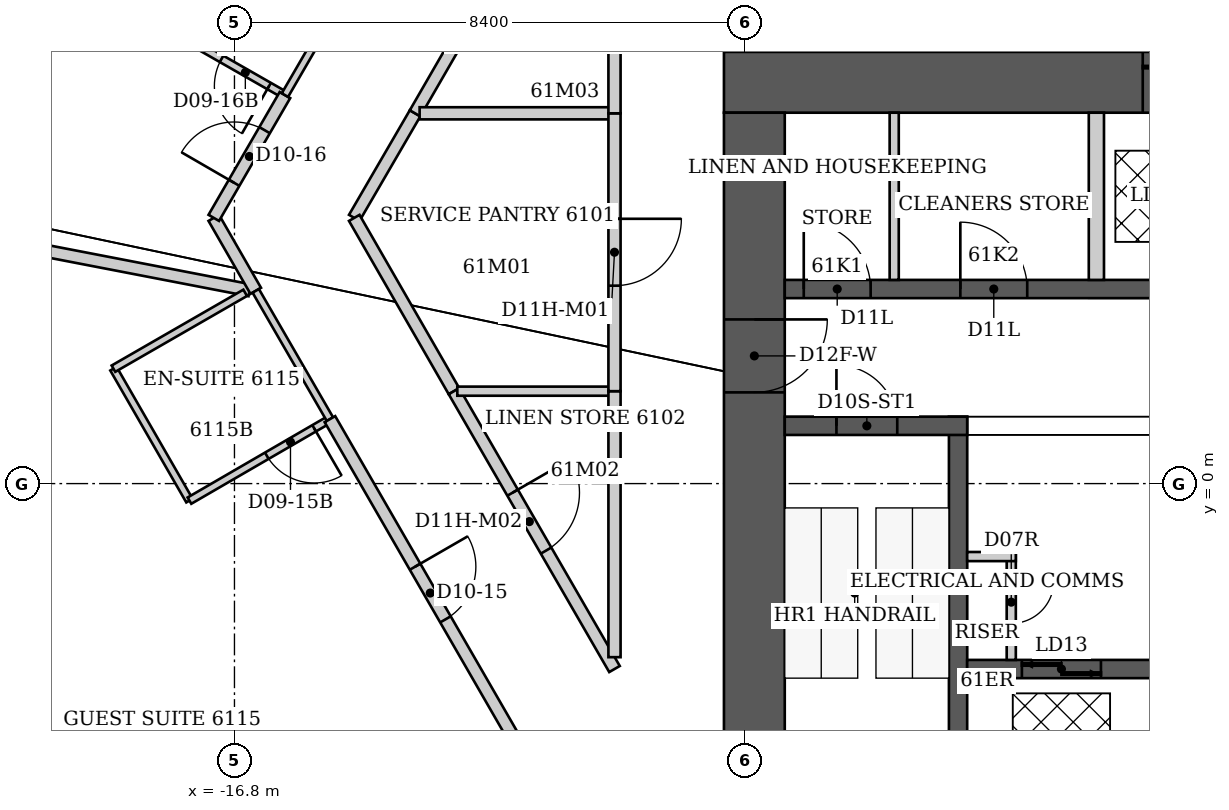
"""IFC4 building model, lengths in metres.
Left out: names, types, materials, properties, quantities, classifications, styles, units other than length and angle.
Written with IfcOpenShell. Run it as: python <this file> out.ifc"""

import sys

from ifc_helpers import new_model, si_unit, direction, frame, frame_2d, origin, origin_2d, place, context, subcontext, project, spatial, rectangle, extrude, element, fill, save


model = new_model("IFC4")
c1 = context("Model", 3, precision=1e-05, world=origin(), true_north=direction((0.0, 1.0)))
c2 = subcontext(c1, "Body", "Model", "MODEL_VIEW")
j1 = project(units=[si_unit("LENGTHUNIT", "METRE"), si_unit("PLANEANGLEUNIT", "RADIAN")], contexts=[c1])
p1 = place(None, origin())
s1 = spatial("IfcSite", under=j1, at=p1, CompositionType="ELEMENT")
p2 = place(p1, origin())
s2 = spatial("IfcBuilding", under=s1, at=p2, CompositionType="ELEMENT")
p3 = place(p2, frame((0.0, 0.0, 244.0)))
s3 = spatial("IfcBuildingStorey", under=s2, at=p3, CompositionType="ELEMENT", Elevation=244.0)
p4 = place(p3, frame((-19.374, -4.991, 0.0), z_axis=(0.054906736272, 0.014111544369, 0.998391764102), x_axis=(-0.864606052926, -0.499473967902, 0.054608869531)))
e1 = element("IfcColumn", 1, at=p4, inside=s3, PredefinedType="COLUMN", context=c2, shape_type="SweptSolid", body=[
    extrude(rectangle(XDim=1.5, YDim=1.5, at=origin_2d()), origin(), (0.0, 0.0, 1.0), 3.806),
])
p5 = place(p3, frame((-8.75, 6.6, 0.0), z_axis=(0.0, 0.0, 1.0), x_axis=(1.0, 0.0, 0.0)))
e2 = element("IfcWall", 2, at=p5, inside=s3, PredefinedType="SHEAR", context=c2, shape_type="SweptSolid", body=[
    extrude(rectangle(XDim=17.5, YDim=1.0, at=frame_2d((8.75, 0.0))), origin(), (0.0, 0.0, 1.0), 3.8),
])
p6 = place(p5, frame((6.887, 0.0, 0.0)))
e3 = element("IfcOpeningElement", 3, at=p6, cuts=e2, PredefinedType="OPENING", context=c2, shape_type="SweptSolid", body=[
    extrude(rectangle(XDim=1.1, YDim=2.1, at=frame_2d((0.55, 1.05))), frame((0.0, 0.5, 0.0), z_axis=(0.0, -1.0, 0.0), x_axis=(1.0, 0.0, 0.0)), (0.0, 0.0, 1.0), 1.0),
])
p7 = place(p5, frame((9.512, 0.0, 0.0)))
e4 = element("IfcOpeningElement", 4, at=p7, cuts=e2, PredefinedType="OPENING", context=c2, shape_type="SweptSolid", body=[
    extrude(rectangle(XDim=1.1, YDim=2.1, at=frame_2d((0.55, 1.05))), frame((0.0, 0.5, 0.0), z_axis=(0.0, -1.0, 0.0), x_axis=(1.0, 0.0, 0.0)), (0.0, 0.0, 1.0), 1.0),
])
p8 = place(p5, frame((12.137, 0.0, 0.0)))
e5 = element("IfcOpeningElement", 5, at=p8, cuts=e2, PredefinedType="OPENING", context=c2, shape_type="SweptSolid", body=[
    extrude(rectangle(XDim=1.1, YDim=2.1, at=frame_2d((0.55, 1.05))), frame((0.0, 0.5, 0.0), z_axis=(0.0, -1.0, 0.0), x_axis=(1.0, 0.0, 0.0)), (0.0, 0.0, 1.0), 1.0),
])
p9 = place(p5, frame((14.762, 0.0, 0.0)))
e6 = element("IfcOpeningElement", 6, at=p9, cuts=e2, PredefinedType="OPENING", context=c2, shape_type="SweptSolid", body=[
    extrude(rectangle(XDim=1.1, YDim=2.1, at=frame_2d((0.55, 1.05))), frame((0.0, 0.5, 0.0), z_axis=(0.0, -1.0, 0.0), x_axis=(1.0, 0.0, 0.0)), (0.0, 0.0, 1.0), 1.0),
])
p10 = place(p3, frame((-8.25, -6.1, 0.0), z_axis=(0.0, 0.0, 1.0), x_axis=(0.0, 1.0, 0.0)))
e7 = element("IfcWall", 7, at=p10, inside=s3, PredefinedType="SHEAR", context=c2, shape_type="SweptSolid", body=[
    extrude(rectangle(XDim=12.2, YDim=1.0, at=frame_2d((6.1, 0.0))), origin(), (0.0, 0.0, 1.0), 3.8),
])
p11 = place(p10, frame((7.6, 0.0, 0.0)))
e8 = element("IfcOpeningElement", 8, at=p11, cuts=e7, PredefinedType="OPENING", context=c2, shape_type="SweptSolid", body=[
    extrude(rectangle(XDim=1.2, YDim=2.2, at=frame_2d((0.6, 1.1))), frame((0.0, 0.5, 0.0), z_axis=(0.0, -1.0, 0.0), x_axis=(1.0, 0.0, 0.0)), (0.0, 0.0, 1.0), 1.0),
])
p12 = place(p3, frame((-4.9, -6.1, 0.0), z_axis=(0.0, 0.0, 1.0), x_axis=(0.0, 1.0, 0.0)))
e9 = element("IfcWall", 9, at=p12, inside=s3, PredefinedType="SHEAR", context=c2, shape_type="SweptSolid", body=[
    extrude(rectangle(XDim=7.2, YDim=0.3, at=frame_2d((3.6, 0.0))), origin(), (0.0, 0.0, 1.0), 3.8),
])
p13 = place(p3, frame((-7.75, 0.95, 0.0), z_axis=(0.0, 0.0, 1.0), x_axis=(1.0, 0.0, 0.0)))
e10 = element("IfcWall", 10, at=p13, inside=s3, PredefinedType="SHEAR", context=c2, shape_type="SweptSolid", body=[
    extrude(rectangle(XDim=3.0, YDim=0.3, at=frame_2d((1.5, 0.0))), origin(), (0.0, 0.0, 1.0), 3.8),
])
p14 = place(p13, frame((0.85, 0.0, 0.0)))
e11 = element("IfcOpeningElement", 11, at=p14, cuts=e10, PredefinedType="OPENING", context=c2, shape_type="SweptSolid", body=[
    extrude(rectangle(XDim=1.0, YDim=2.2, at=frame_2d((0.5, 1.1))), frame((0.0, 0.15, 0.0), z_axis=(0.0, -1.0, 0.0), x_axis=(1.0, 0.0, 0.0)), (0.0, 0.0, 1.0), 0.3),
])
p15 = place(p3, frame((-4.75, -3.05, 0.0), z_axis=(0.0, 0.0, 1.0), x_axis=(1.0, 0.0, 0.0)))
e12 = element("IfcWall", 12, at=p15, inside=s3, PredefinedType="SHEAR", context=c2, shape_type="SweptSolid", body=[
    extrude(rectangle(XDim=3.1, YDim=0.3, at=frame_2d((1.55, 0.0))), origin(), (0.0, 0.0, 1.0), 3.8),
])
p16 = place(p15, frame((0.9, 0.0, 0.0)))
e13 = element("IfcOpeningElement", 13, at=p16, cuts=e12, PredefinedType="OPENING", context=c2, shape_type="SweptSolid", body=[
    extrude(rectangle(XDim=1.3, YDim=2.1, at=frame_2d((0.65, 1.05))), frame((0.0, 0.15, 0.0), z_axis=(0.0, -1.0, 0.0), x_axis=(1.0, 0.0, 0.0)), (0.0, 0.0, 1.0), 0.3),
])
p17 = place(p3, frame((-7.75, 3.2, 0.0), z_axis=(0.0, 0.0, 1.0), x_axis=(1.0, 0.0, 0.0)))
e14 = element("IfcWall", 14, at=p17, inside=s3, PredefinedType="SHEAR", context=c2, shape_type="SweptSolid", body=[
    extrude(rectangle(XDim=15.5, YDim=0.3, at=frame_2d((7.75, 0.0))), origin(), (0.0, 0.0, 1.0), 3.8),
])
p18 = place(p17, frame((0.312, 0.0, 0.0)))
e15 = element("IfcOpeningElement", 15, at=p18, cuts=e14, PredefinedType="OPENING", context=c2, shape_type="SweptSolid", body=[
    extrude(rectangle(XDim=1.1, YDim=2.2, at=frame_2d((0.55, 1.1))), frame((0.0, 0.15, 0.0), z_axis=(0.0, -1.0, 0.0), x_axis=(1.0, 0.0, 0.0)), (0.0, 0.0, 1.0), 0.3),
])
p19 = place(p17, frame((2.887, 0.0, 0.0)))
e16 = element("IfcOpeningElement", 16, at=p19, cuts=e14, PredefinedType="OPENING", context=c2, shape_type="SweptSolid", body=[
    extrude(rectangle(XDim=1.1, YDim=2.2, at=frame_2d((0.55, 1.1))), frame((0.0, 0.15, 0.0), z_axis=(0.0, -1.0, 0.0), x_axis=(1.0, 0.0, 0.0)), (0.0, 0.0, 1.0), 0.3),
])
p20 = place(p3, frame((-2.625, 3.35, 0.0), z_axis=(0.0, 0.0, 1.0), x_axis=(0.0, 1.0, 0.0)))
e17 = element("IfcWall", 17, at=p20, inside=s3, PredefinedType="PARTITIONING", context=c2, shape_type="SweptSolid", body=[
    extrude(rectangle(XDim=2.75, YDim=0.25, at=frame_2d((1.375, 0.0))), origin(), (0.0, 0.0, 1.0), 3.8),
])
p21 = place(p3, frame((-27.041, 5.204, 0.0), z_axis=(0.0, 0.0, 1.0), x_axis=(0.981884490433, -0.18948046719, 0.0)))
e18 = element("IfcWall", 18, at=p21, inside=s3, PredefinedType="PARTITIONING", context=c2, shape_type="SweptSolid", body=[
    extrude(rectangle(XDim=10.684, YDim=0.2, at=frame_2d((5.342, 0.0))), origin(), (0.0, 0.0, 1.0), 3.64),
])
p22 = place(p3, frame((-18.79, 1.89, 0.0), z_axis=(0.0, 0.0, 1.0), x_axis=(0.499159685399, -0.866510016372, 0.0)))
e19 = element("IfcWall", 19, at=p22, inside=s3, PredefinedType="PARTITIONING", context=c2, shape_type="SweptSolid", body=[
    extrude(rectangle(XDim=2.504, YDim=0.12, at=frame_2d((1.252, 0.0))), origin(), (0.0, 0.0, 1.0), 3.64),
])
p23 = place(p3, frame((-18.28, 7.71, 0.0), z_axis=(0.0, 0.0, 1.0), x_axis=(0.868277022428, -0.496079643125, 0.0)))
e20 = element("IfcWall", 20, at=p23, inside=s3, PredefinedType="PARTITIONING", context=c2, shape_type="SweptSolid", body=[
    extrude(rectangle(XDim=2.66, YDim=0.12, at=frame_2d((1.33, 0.0))), origin(), (0.0, 0.0, 1.0), 3.64),
])
p24 = place(p23, frame((1.46, 0.0, 0.0)))
e21 = element("IfcOpeningElement", 21, at=p24, cuts=e20, PredefinedType="OPENING", context=c2, shape_type="SweptSolid", body=[
    extrude(rectangle(XDim=0.9, YDim=2.03, at=frame_2d((0.45, 1.015))), frame((0.0, 0.06, 0.0), z_axis=(0.0, -1.0, 0.0), x_axis=(1.0, 0.0, 0.0)), (0.0, 0.0, 1.0), 0.12),
])
p25 = place(p3, frame((-17.54, -0.28, 0.0), z_axis=(0.0, 0.0, 1.0), x_axis=(0.86498992408, 0.501789229896, 0.0)))
e22 = element("IfcWall", 22, at=p25, inside=s3, PredefinedType="PARTITIONING", context=c2, shape_type="SweptSolid", body=[
    extrude(rectangle(XDim=2.671, YDim=0.12, at=frame_2d((1.335, 0.0))), origin(), (0.0, 0.0, 1.0), 3.64),
])
p26 = place(p25, frame((1.47, 0.0, 0.0)))
e23 = element("IfcOpeningElement", 23, at=p26, cuts=e22, PredefinedType="OPENING", context=c2, shape_type="SweptSolid", body=[
    extrude(rectangle(XDim=0.9, YDim=2.03, at=frame_2d((0.45, 1.015))), frame((0.0, 0.06, 0.0), z_axis=(0.0, -1.0, 0.0), x_axis=(1.0, 0.0, 0.0)), (0.0, 0.0, 1.0), 0.12),
])
p27 = place(p3, frame((-17.14, 4.37, 0.0), z_axis=(0.0, 0.0, 1.0), x_axis=(0.498378346744, -0.866959643522, 0.0)))
e24 = element("IfcWall", 24, at=p27, inside=s3, PredefinedType="PARTITIONING", context=c2, shape_type="SweptSolid", body=[
    extrude(rectangle(XDim=1.384, YDim=0.2, at=frame_2d((0.692, 0.0))), origin(), (0.0, 0.0, 1.0), 3.64),
])
p28 = place(p3, frame((-17.14, 4.37, 0.0), z_axis=(0.0, 0.0, 1.0), x_axis=(0.501176435338, 0.865345122285, 0.0)))
e25 = element("IfcWall", 25, at=p28, inside=s3, PredefinedType="PARTITIONING", context=c2, shape_type="SweptSolid", body=[
    extrude(rectangle(XDim=2.334, YDim=0.2, at=frame_2d((1.167, 0.0))), origin(), (0.0, 0.0, 1.0), 3.64),
])
p29 = place(p28, frame((0.667, 0.0, 0.0)))
e26 = element("IfcOpeningElement", 26, at=p29, cuts=e25, PredefinedType="OPENING", context=c2, shape_type="SweptSolid", body=[
    extrude(rectangle(XDim=1.0, YDim=2.13, at=frame_2d((0.5, 1.065))), frame((0.0, 0.1, 0.0), z_axis=(0.0, -1.0, 0.0), x_axis=(1.0, 0.0, 0.0)), (0.0, 0.0, 1.0), 0.2),
])
p30 = place(p3, frame((-16.624, 3.138, 0.0), z_axis=(0.0, 0.0, 1.0), x_axis=(-0.866525185869, -0.499133351175, 0.0)))
e27 = element("IfcWall", 27, at=p30, inside=s3, PredefinedType="PARTITIONING", context=c2, shape_type="SweptSolid", body=[
    extrude(rectangle(XDim=2.5, YDim=0.12, at=frame_2d((1.25, 0.0))), origin(), (0.0, 0.0, 1.0), 3.64),
])
p31 = place(p3, frame((-16.45, 3.17, 0.0), z_axis=(0.0, 0.0, 1.0), x_axis=(0.500566296323, -0.865698205488, 0.0)))
e28 = element("IfcWall", 28, at=p31, inside=s3, PredefinedType="PARTITIONING", context=c2, shape_type="SweptSolid", body=[
    extrude(rectangle(XDim=2.437, YDim=0.12, at=frame_2d((1.219, 0.0))), origin(), (0.0, 0.0, 1.0), 3.64),
])
p32 = place(p3, frame((-15.23, 1.06, 0.0), z_axis=(0.0, 0.0, 1.0), x_axis=(0.499729921425, -0.866181277581, 0.0)))
e29 = element("IfcWall", 29, at=p32, inside=s3, PredefinedType="PARTITIONING", context=c2, shape_type="SweptSolid", body=[
    extrude(rectangle(XDim=6.604, YDim=0.2, at=frame_2d((3.302, 0.0))), origin(), (0.0, 0.0, 1.0), 3.64),
])
p33 = place(p32, frame((2.802, 0.0, 0.0)))
e30 = element("IfcOpeningElement", 30, at=p33, cuts=e29, PredefinedType="OPENING", context=c2, shape_type="SweptSolid", body=[
    extrude(rectangle(XDim=1.0, YDim=2.13, at=frame_2d((0.5, 1.065))), frame((0.0, 0.1, 0.0), z_axis=(0.0, -1.0, 0.0), x_axis=(1.0, 0.0, 0.0)), (0.0, 0.0, 1.0), 0.2),
])
p34 = place(p3, frame((-14.83, 4.37, 0.0), z_axis=(0.0, 0.0, 1.0), x_axis=(0.502626855825, 0.864503466623, 0.0)))
e31 = element("IfcWall", 31, at=p34, inside=s3, PredefinedType="PARTITIONING", context=c2, shape_type="SweptSolid", body=[
    extrude(rectangle(XDim=1.99, YDim=0.2, at=frame_2d((0.995, 0.0))), origin(), (0.0, 0.0, 1.0), 3.64),
])
p35 = place(p3, frame((-14.74, 8.51, 0.0), z_axis=(0.0, 0.0, 1.0), x_axis=(-0.501813488763, -0.864975850817, 0.0)))
e32 = element("IfcWall", 32, at=p35, inside=s3, PredefinedType="PARTITIONING", context=c2, shape_type="SweptSolid", body=[
    extrude(rectangle(XDim=2.451, YDim=0.12, at=frame_2d((1.226, 0.0))), origin(), (0.0, 0.0, 1.0), 3.64),
])
p36 = place(p3, frame((-13.83, 6.09, 0.0), z_axis=(0.0, 0.0, 1.0), x_axis=(0.500248310865, 0.865881993967, 0.0)))
e33 = element("IfcWall", 33, at=p36, inside=s3, PredefinedType="PARTITIONING", context=c2, shape_type="SweptSolid", body=[
    extrude(rectangle(XDim=5.278, YDim=0.2, at=frame_2d((2.639, 0.0))), origin(), (0.0, 0.0, 1.0), 3.64),
])
p37 = place(p3, frame((-13.755, 6.09, 0.0), z_axis=(0.0, 0.0, 1.0), x_axis=(1.0, 0.0, 0.0)))
e34 = element("IfcWall", 34, at=p37, inside=s3, PredefinedType="PARTITIONING", context=c2, shape_type="SweptSolid", body=[
    extrude(rectangle(XDim=3.195, YDim=0.2, at=frame_2d((1.597, 0.0))), origin(), (0.0, 0.0, 1.0), 3.64),
])
p38 = place(p3, frame((-13.19, 1.52, 0.0), z_axis=(0.0, 0.0, 1.0), x_axis=(-0.498775186059, 0.866731396554, 0.0)))
e35 = element("IfcWall", 35, at=p38, inside=s3, PredefinedType="PARTITIONING", context=c2, shape_type="SweptSolid", body=[
    extrude(rectangle(XDim=3.288, YDim=0.2, at=frame_2d((1.644, 0.0))), origin(), (0.0, 0.0, 1.0), 3.64),
])
p39 = place(p3, frame((-10.55, -3.05, 0.0), z_axis=(0.0, 0.0, 1.0), x_axis=(-0.500193590286, 0.865913605527, 0.0)))
e36 = element("IfcWall", 36, at=p39, inside=s3, PredefinedType="PARTITIONING", context=c2, shape_type="SweptSolid", body=[
    extrude(rectangle(XDim=5.278, YDim=0.2, at=frame_2d((2.639, 0.0))), origin(), (0.0, 0.0, 1.0), 3.64),
])
p40 = place(p39, frame((2.25, 0.0, 0.0)))
e37 = element("IfcOpeningElement", 37, at=p40, cuts=e36, PredefinedType="OPENING", context=c2, shape_type="SweptSolid", body=[
    extrude(rectangle(XDim=1.1, YDim=2.2, at=frame_2d((0.55, 1.1))), frame((0.0, 0.1, 0.0), z_axis=(0.0, -1.0, 0.0), x_axis=(1.0, 0.0, 0.0)), (0.0, 0.0, 1.0), 0.2),
])
p41 = place(p3, frame((-10.55, 1.52, 0.0), z_axis=(0.0, 0.0, 1.0), x_axis=(-1.0, 0.0, 0.0)))
e38 = element("IfcWall", 38, at=p41, inside=s3, PredefinedType="PARTITIONING", context=c2, shape_type="SweptSolid", body=[
    extrude(rectangle(XDim=2.585, YDim=0.15, at=frame_2d((1.292, 0.0))), origin(), (0.0, 0.0, 1.0), 3.64),
])
p42 = place(p3, frame((-10.55, 1.52, 0.0), z_axis=(0.0, 0.0, 1.0), x_axis=(0.0, -1.0, 0.0)))
e39 = element("IfcWall", 39, at=p42, inside=s3, PredefinedType="PARTITIONING", context=c2, shape_type="SweptSolid", body=[
    extrude(rectangle(XDim=4.375, YDim=0.2, at=frame_2d((2.188, 0.0))), origin(), (0.0, 0.0, 1.0), 3.64),
])
p43 = place(p3, frame((-10.55, 6.09, 0.0), z_axis=(0.0, 0.0, 1.0), x_axis=(0.0, -1.0, 0.0)))
e40 = element("IfcWall", 40, at=p43, inside=s3, PredefinedType="PARTITIONING", context=c2, shape_type="SweptSolid", body=[
    extrude(rectangle(XDim=4.57, YDim=0.2, at=frame_2d((2.285, 0.0))), origin(), (0.0, 0.0, 1.0), 3.64),
])
p44 = place(p43, frame((1.735, 0.0, 0.0)))
e41 = element("IfcOpeningElement", 41, at=p44, cuts=e40, PredefinedType="OPENING", context=c2, shape_type="SweptSolid", body=[
    extrude(rectangle(XDim=1.1, YDim=2.2, at=frame_2d((0.55, 1.1))), frame((0.0, 0.1, 0.0), z_axis=(0.0, -1.0, 0.0), x_axis=(1.0, 0.0, 0.0)), (0.0, 0.0, 1.0), 0.2),
])
p45 = place(p3, frame((-10.55, 8.89, 0.0), z_axis=(0.0, 0.0, 1.0), x_axis=(0.0, -1.0, 0.0)))
e42 = element("IfcWall", 42, at=p45, inside=s3, PredefinedType="PARTITIONING", context=c2, shape_type="SweptSolid", body=[
    extrude(rectangle(XDim=2.8, YDim=0.2, at=frame_2d((1.4, 0.0))), origin(), (0.0, 0.0, 1.0), 3.64),
])
p46 = place(p3, frame((-4.025, -2.9, 0.0), z_axis=(0.0, 0.0, 1.0), x_axis=(0.0, 1.0, 0.0)))
e43 = element("IfcWall", 43, at=p46, inside=s3, PredefinedType="PARTITIONING", context=c2, shape_type="SweptSolid", body=[
    extrude(rectangle(XDim=1.775, YDim=0.15, at=frame_2d((0.887, 0.0))), origin(), (0.0, 0.0, 1.0), 3.64),
])
p47 = place(p46, frame((0.6, 0.0, 0.0)))
e44 = element("IfcOpeningElement", 44, at=p47, cuts=e43, PredefinedType="OPENING", context=c2, shape_type="SweptSolid", body=[
    extrude(rectangle(XDim=0.7, YDim=2.1, at=frame_2d((0.35, 1.05))), frame((0.0, 0.075, 0.0), z_axis=(0.0, -1.0, 0.0), x_axis=(1.0, 0.0, 0.0)), (0.0, 0.0, 1.0), 0.15),
])
p48 = place(p3, frame((-4.75, -1.2, 0.0), z_axis=(0.0, 0.0, 1.0), x_axis=(1.0, 0.0, 0.0)))
e45 = element("IfcWall", 45, at=p48, inside=s3, PredefinedType="PARTITIONING", context=c2, shape_type="SweptSolid", body=[
    extrude(rectangle(XDim=0.8, YDim=0.15, at=frame_2d((0.4, 0.0))), origin(), (0.0, 0.0, 1.0), 3.64),
])
p49 = place(p3, frame((-5.95, 3.35, 0.0), z_axis=(0.0, 0.0, 1.0), x_axis=(0.0, 1.0, 0.0)))
e46 = element("IfcWall", 46, at=p49, inside=s3, PredefinedType="PARTITIONING", context=c2, shape_type="SweptSolid", body=[
    extrude(rectangle(XDim=2.75, YDim=0.15, at=frame_2d((1.375, 0.0))), origin(), (0.0, 0.0, 1.0), 3.64),
])
p50 = place(p33, origin())
e47 = element("IfcDoor", 47, at=p50, inside=s3, OperationType="SINGLE_SWING_LEFT", PredefinedType="DOOR", context=c2, shape_type="SweptSolid", body=[
    extrude(rectangle(XDim=1.0, YDim=2.13, at=frame_2d((0.5, 1.065))), frame((0.0, 0.025, 0.0), z_axis=(0.0, -1.0, 0.0), x_axis=(1.0, 0.0, 0.0)), (0.0, 0.0, 1.0), 0.05),
])
fill(e30, e47)
p51 = place(p26, origin())
e48 = element("IfcDoor", 48, at=p51, inside=s3, OperationType="SINGLE_SWING_RIGHT", PredefinedType="DOOR", context=c2, shape_type="SweptSolid", body=[
    extrude(rectangle(XDim=0.9, YDim=2.03, at=frame_2d((0.45, 1.015))), frame((0.0, 0.025, 0.0), z_axis=(0.0, -1.0, 0.0), x_axis=(1.0, 0.0, 0.0)), (0.0, 0.0, 1.0), 0.05),
])
fill(e23, e48)
p52 = place(p29, origin())
e49 = element("IfcDoor", 49, at=p52, inside=s3, OperationType="SINGLE_SWING_LEFT", PredefinedType="DOOR", context=c2, shape_type="SweptSolid", body=[
    extrude(rectangle(XDim=1.0, YDim=2.13, at=frame_2d((0.5, 1.065))), frame((0.0, 0.025, 0.0), z_axis=(0.0, -1.0, 0.0), x_axis=(1.0, 0.0, 0.0)), (0.0, 0.0, 1.0), 0.05),
])
fill(e26, e49)
p53 = place(p24, origin())
e50 = element("IfcDoor", 50, at=p53, inside=s3, OperationType="SINGLE_SWING_RIGHT", PredefinedType="DOOR", context=c2, shape_type="SweptSolid", body=[
    extrude(rectangle(XDim=0.9, YDim=2.03, at=frame_2d((0.45, 1.015))), frame((0.0, 0.025, 0.0), z_axis=(0.0, -1.0, 0.0), x_axis=(1.0, 0.0, 0.0)), (0.0, 0.0, 1.0), 0.05),
])
fill(e21, e50)
p54 = place(p44, origin())
e51 = element("IfcDoor", 51, at=p54, inside=s3, OperationType="SINGLE_SWING_LEFT", PredefinedType="DOOR", context=c2, shape_type="SweptSolid", body=[
    extrude(rectangle(XDim=1.1, YDim=2.2, at=frame_2d((0.55, 1.1))), frame((0.0, 0.025, 0.0), z_axis=(0.0, -1.0, 0.0), x_axis=(1.0, 0.0, 0.0)), (0.0, 0.0, 1.0), 0.05),
])
fill(e41, e51)
p55 = place(p40, origin())
e52 = element("IfcDoor", 52, at=p55, inside=s3, OperationType="SINGLE_SWING_RIGHT", PredefinedType="DOOR", context=c2, shape_type="SweptSolid", body=[
    extrude(rectangle(XDim=1.1, YDim=2.2, at=frame_2d((0.55, 1.1))), frame((0.0, 0.025, 0.0), z_axis=(0.0, -1.0, 0.0), x_axis=(1.0, 0.0, 0.0)), (0.0, 0.0, 1.0), 0.05),
])
fill(e37, e52)
p56 = place(p14, origin())
e53 = element("IfcDoor", 53, at=p56, inside=s3, OperationType="SINGLE_SWING_LEFT", PredefinedType="DOOR", context=c2, shape_type="SweptSolid", body=[
    extrude(rectangle(XDim=1.0, YDim=2.2, at=frame_2d((0.5, 1.1))), frame((0.0, 0.025, 0.0), z_axis=(0.0, -1.0, 0.0), x_axis=(1.0, 0.0, 0.0)), (0.0, 0.0, 1.0), 0.05),
])
fill(e11, e53)
p57 = place(p11, origin())
e54 = element("IfcDoor", 54, at=p57, inside=s3, OperationType="SINGLE_SWING_RIGHT", PredefinedType="DOOR", context=c2, shape_type="SweptSolid", body=[
    extrude(rectangle(XDim=1.2, YDim=2.2, at=frame_2d((0.6, 1.1))), frame((0.0, 0.025, 0.0), z_axis=(0.0, -1.0, 0.0), x_axis=(1.0, 0.0, 0.0)), (0.0, 0.0, 1.0), 0.05),
])
fill(e8, e54)
p58 = place(p47, origin())
e55 = element("IfcDoor", 55, at=p58, inside=s3, OperationType="SINGLE_SWING_RIGHT", PredefinedType="DOOR", context=c2, shape_type="SweptSolid", body=[
    extrude(rectangle(XDim=0.7, YDim=2.1, at=frame_2d((0.35, 1.05))), frame((0.0, 0.025, 0.0), z_axis=(0.0, -1.0, 0.0), x_axis=(1.0, 0.0, 0.0)), (0.0, 0.0, 1.0), 0.05),
])
fill(e44, e55)
p59 = place(p18, origin())
e56 = element("IfcDoor", 56, at=p59, inside=s3, OperationType="SINGLE_SWING_LEFT", PredefinedType="DOOR", context=c2, shape_type="SweptSolid", body=[
    extrude(rectangle(XDim=1.1, YDim=2.2, at=frame_2d((0.55, 1.1))), frame((0.0, 0.025, 0.0), z_axis=(0.0, -1.0, 0.0), x_axis=(1.0, 0.0, 0.0)), (0.0, 0.0, 1.0), 0.05),
])
fill(e15, e56)
p60 = place(p19, origin())
e57 = element("IfcDoor", 57, at=p60, inside=s3, OperationType="SINGLE_SWING_LEFT", PredefinedType="DOOR", context=c2, shape_type="SweptSolid", body=[
    extrude(rectangle(XDim=1.1, YDim=2.2, at=frame_2d((0.55, 1.1))), frame((0.0, 0.025, 0.0), z_axis=(0.0, -1.0, 0.0), x_axis=(1.0, 0.0, 0.0)), (0.0, 0.0, 1.0), 0.05),
])
fill(e16, e57)
p61 = place(p6, origin())
e58 = element("IfcDoor", 58, at=p61, inside=s3, OperationType="DOUBLE_DOOR_SLIDING", PredefinedType="DOOR", context=c2, shape_type="SweptSolid", body=[
    extrude(rectangle(XDim=1.1, YDim=2.1, at=frame_2d((0.55, 1.05))), frame((0.0, 0.025, 0.0), z_axis=(0.0, -1.0, 0.0), x_axis=(1.0, 0.0, 0.0)), (0.0, 0.0, 1.0), 0.05),
])
fill(e3, e58)
p62 = place(p16, origin())
e59 = element("IfcDoor", 59, at=p62, inside=s3, OperationType="DOUBLE_DOOR_SLIDING", PredefinedType="DOOR", context=c2, shape_type="SweptSolid", body=[
    extrude(rectangle(XDim=1.3, YDim=2.1, at=frame_2d((0.65, 1.05))), frame((0.0, 0.025, 0.0), z_axis=(0.0, -1.0, 0.0), x_axis=(1.0, 0.0, 0.0)), (0.0, 0.0, 1.0), 0.05),
])
fill(e13, e59)
save(model, sys.argv[1])
